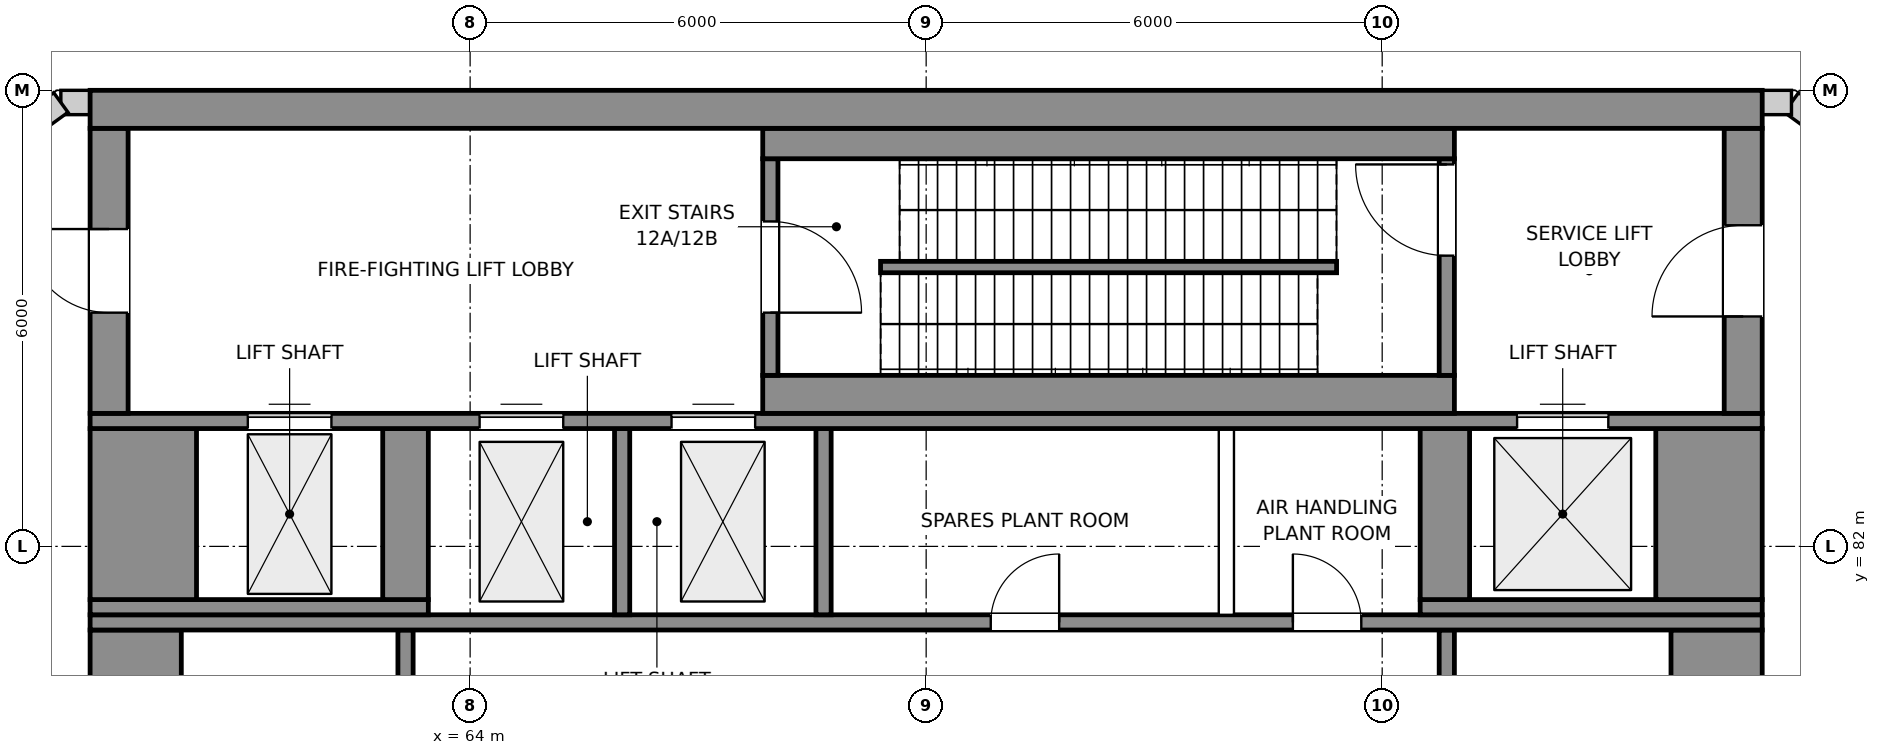
"""IFC4 building model, lengths in metres.
Left out: names, types, materials, properties, quantities, classifications, styles, units other than length and angle.
Written with IfcOpenShell. Run it as: python <this file> out.ifc"""

import sys

from ifc_helpers import new_model, si_unit, direction, frame, frame_2d, origin, place, context, subcontext, project, spatial, rectangle, extrude, element, fill, save


model = new_model("IFC4")
c1 = context("Model", 3, precision=1e-05, world=origin(), true_north=direction((0.0, 1.0)))
c2 = subcontext(c1, "Body", "Model", "MODEL_VIEW")
j1 = project(units=[si_unit("LENGTHUNIT", "METRE"), si_unit("PLANEANGLEUNIT", "RADIAN")], contexts=[c1])
p1 = place(None, origin())
s1 = spatial("IfcSite", under=j1, at=p1, CompositionType="ELEMENT")
p2 = place(p1, origin())
s2 = spatial("IfcBuilding", under=s1, at=p2, CompositionType="ELEMENT")
p3 = place(p2, frame((0.0, 0.0, 333.2)))
s3 = spatial("IfcBuildingStorey", under=s2, at=p3, CompositionType="ELEMENT", Elevation=333.2)
p4 = place(p3, frame((85.669, 84.728, 0.0), z_axis=(0.0, 0.0, 1.0), x_axis=(-0.808993209203, 0.587817988381, 0.0)))
e1 = element("IfcWall", 1, at=p4, inside=s3, PredefinedType="SOLIDWALL", context=c2, shape_type="SweptSolid", body=[
    extrude(rectangle(XDim=5.295, YDim=0.32, at=frame_2d((2.647, 0.0))), origin(), (0.0, 0.0, 1.0), 4.2),
])
for number, where, z_axis, x_axis in (
    (2, (81.385, 87.84, 0.0), (0.0, 0.0, 1.0), (-1.0, 0.0, 0.0)),
    (3, (59.0, 87.84, 0.0), (0.0, 0.0, 1.0), (-1.0, 0.0, 0.0)),
):
    element("IfcWall", number, at=place(p3, frame(where, z_axis=z_axis, x_axis=x_axis)), inside=s3, PredefinedType="SOLIDWALL", context=c2, shape_type="SweptSolid", body=[
        extrude(rectangle(XDim=0.385, YDim=0.32, at=frame_2d((0.192, 0.0))), origin(), (0.0, 0.0, 1.0), 4.2),
    ])
p5 = place(p3, frame((58.615, 87.84, 0.0), z_axis=(0.0, 0.0, 1.0), x_axis=(-0.808993209203, -0.587817988381, 0.0)))
e4 = element("IfcWall", 4, at=p5, inside=s3, PredefinedType="SOLIDWALL", context=c2, shape_type="SweptSolid", body=[
    extrude(rectangle(XDim=5.295, YDim=0.32, at=frame_2d((2.647, 0.0))), origin(), (0.0, 0.0, 1.0), 4.2),
])
for number, where, z_axis, x_axis in (
    (5, (59.6, 71.5, 0.0), (0.0, 0.0, 1.0), (0.0, 1.0, 0.0)),
    (6, (80.4, 71.5, 0.0), (0.0, 0.0, 1.0), (0.0, 1.0, 0.0)),
):
    element("IfcWall", number, at=place(p3, frame(where, z_axis=z_axis, x_axis=x_axis)), inside=s3, PredefinedType="SHEAR", context=c2, shape_type="SweptSolid", body=[
        extrude(rectangle(XDim=9.4, YDim=1.2, at=frame_2d((4.7, 0.0))), origin(), (0.0, 0.0, 1.0), 4.5),
    ])
for number, where, z_axis, x_axis in (
    (7, (63.15, 77.7, 0.0), (0.0, 0.0, 1.0), (0.0, 1.0, 0.0)),
    (8, (76.85, 77.7, 0.0), (0.0, 0.0, 1.0), (0.0, 1.0, 0.0)),
):
    element("IfcWall", number, at=place(p3, frame(where, z_axis=z_axis, x_axis=x_axis)), inside=s3, PredefinedType="SHEAR", context=c2, shape_type="SweptSolid", body=[
        extrude(rectangle(XDim=3.2, YDim=0.2, at=frame_2d((1.6, 0.0))), origin(), (0.0, 0.0, 1.0), 4.5),
    ])
p6 = place(p3, frame((59.0, 81.0, 0.0), z_axis=(0.0, 0.0, 1.0), x_axis=(1.0, 0.0, 0.0)))
e9 = element("IfcWall", 9, at=p6, inside=s3, PredefinedType="SHEAR", context=c2, shape_type="SweptSolid", body=[
    extrude(rectangle(XDim=22.0, YDim=0.2, at=frame_2d((11.0, 0.0))), origin(), (0.0, 0.0, 1.0), 4.5),
])
p7 = place(p6, frame((11.85, 0.0, 0.0)))
e10 = element("IfcOpeningElement", 10, at=p7, cuts=e9, PredefinedType="OPENING", context=c2, shape_type="SweptSolid", body=[
    extrude(rectangle(XDim=0.9, YDim=2.1, at=frame_2d((0.45, 1.05))), frame((0.0, 0.11, 0.0), z_axis=(0.0, -1.0, 0.0), x_axis=(1.0, 0.0, 0.0)), (0.0, 0.0, 1.0), 0.22),
])
p8 = place(p6, frame((15.825, 0.0, 0.0)))
e11 = element("IfcOpeningElement", 11, at=p8, cuts=e9, PredefinedType="OPENING", context=c2, shape_type="SweptSolid", body=[
    extrude(rectangle(XDim=0.9, YDim=2.1, at=frame_2d((0.45, 1.05))), frame((0.0, 0.11, 0.0), z_axis=(0.0, -1.0, 0.0), x_axis=(1.0, 0.0, 0.0)), (0.0, 0.0, 1.0), 0.22),
])
p9 = place(p3, frame((59.0, 81.2, 0.0), z_axis=(0.0, 0.0, 1.0), x_axis=(1.0, 0.0, 0.0)))
e12 = element("IfcWall", 12, at=p9, inside=s3, PredefinedType="SHEAR", context=c2, shape_type="SweptSolid", body=[
    extrude(rectangle(XDim=4.45, YDim=0.2, at=frame_2d((2.225, 0.0))), origin(), (0.0, 0.0, 1.0), 4.5),
])
for number, where, z_axis, x_axis in (
    (13, (66.0, 81.1, 0.0), (0.0, 0.0, 1.0), (0.0, 1.0, 0.0)),
    (14, (68.65, 81.1, 0.0), (0.0, 0.0, 1.0), (0.0, 1.0, 0.0)),
):
    element("IfcWall", number, at=place(p3, frame(where, z_axis=z_axis, x_axis=x_axis)), inside=s3, PredefinedType="SHEAR", context=c2, shape_type="SweptSolid", body=[
        extrude(rectangle(XDim=2.45, YDim=0.2, at=frame_2d((1.225, 0.0))), origin(), (0.0, 0.0, 1.0), 4.5),
    ])
p10 = place(p3, frame((73.95, 81.1, 0.0), z_axis=(0.0, 0.0, 1.0), x_axis=(0.0, 1.0, 0.0)))
e15 = element("IfcWall", 15, at=p10, inside=s3, PredefinedType="PARTITIONING", context=c2, shape_type="SweptSolid", body=[
    extrude(rectangle(XDim=2.45, YDim=0.2, at=frame_2d((1.225, 0.0))), origin(), (0.0, 0.0, 1.0), 4.2),
])
p11 = place(p3, frame((76.5, 81.2, 0.0), z_axis=(0.0, 0.0, 1.0), x_axis=(1.0, 0.0, 0.0)))
e16 = element("IfcWall", 16, at=p11, inside=s3, PredefinedType="SHEAR", context=c2, shape_type="SweptSolid", body=[
    extrude(rectangle(XDim=4.5, YDim=0.2, at=frame_2d((2.25, 0.0))), origin(), (0.0, 0.0, 1.0), 4.5),
])
p12 = place(p3, frame((59.7, 81.3, 0.0), z_axis=(0.0, 0.0, 1.0), x_axis=(0.0, 1.0, 0.0)))
e17 = element("IfcWall", 17, at=p12, inside=s3, PredefinedType="SHEAR", context=c2, shape_type="SweptSolid", body=[
    extrude(rectangle(XDim=2.25, YDim=1.4, at=frame_2d((1.125, 0.0))), origin(), (0.0, 0.0, 1.0), 4.5),
])
p13 = place(p3, frame((63.15, 81.3, 0.0), z_axis=(0.0, 0.0, 1.0), x_axis=(0.0, 1.0, 0.0)))
e18 = element("IfcWall", 18, at=p13, inside=s3, PredefinedType="SHEAR", context=c2, shape_type="SweptSolid", body=[
    extrude(rectangle(XDim=2.25, YDim=0.6, at=frame_2d((1.125, 0.0))), origin(), (0.0, 0.0, 1.0), 4.5),
])
p14 = place(p3, frame((76.825, 81.3, 0.0), z_axis=(0.0, 0.0, 1.0), x_axis=(0.0, 1.0, 0.0)))
e19 = element("IfcWall", 19, at=p14, inside=s3, PredefinedType="SHEAR", context=c2, shape_type="SweptSolid", body=[
    extrude(rectangle(XDim=2.25, YDim=0.65, at=frame_2d((1.125, 0.0))), origin(), (0.0, 0.0, 1.0), 4.5),
])
p15 = place(p3, frame((80.3, 81.3, 0.0), z_axis=(0.0, 0.0, 1.0), x_axis=(0.0, 1.0, 0.0)))
e20 = element("IfcWall", 20, at=p15, inside=s3, PredefinedType="SHEAR", context=c2, shape_type="SweptSolid", body=[
    extrude(rectangle(XDim=2.25, YDim=1.4, at=frame_2d((1.125, 0.0))), origin(), (0.0, 0.0, 1.0), 4.5),
])
p16 = place(p3, frame((59.0, 83.65, 0.0), z_axis=(0.0, 0.0, 1.0), x_axis=(1.0, 0.0, 0.0)))
e21 = element("IfcWall", 21, at=p16, inside=s3, PredefinedType="SHEAR", context=c2, shape_type="SweptSolid", body=[
    extrude(rectangle(XDim=22.0, YDim=0.2, at=frame_2d((11.0, 0.0))), origin(), (0.0, 0.0, 1.0), 4.5),
])
p17 = place(p16, frame((5.125, 0.0, 0.0)))
e22 = element("IfcOpeningElement", 22, at=p17, cuts=e21, PredefinedType="OPENING", context=c2, shape_type="SweptSolid", body=[
    extrude(rectangle(XDim=1.1, YDim=2.1, at=frame_2d((0.55, 1.05))), frame((0.0, 0.11, 0.0), z_axis=(0.0, -1.0, 0.0), x_axis=(1.0, 0.0, 0.0)), (0.0, 0.0, 1.0), 0.22),
])
p18 = place(p16, frame((7.65, 0.0, 0.0)))
e23 = element("IfcOpeningElement", 23, at=p18, cuts=e21, PredefinedType="OPENING", context=c2, shape_type="SweptSolid", body=[
    extrude(rectangle(XDim=1.1, YDim=2.1, at=frame_2d((0.55, 1.05))), frame((0.0, 0.11, 0.0), z_axis=(0.0, -1.0, 0.0), x_axis=(1.0, 0.0, 0.0)), (0.0, 0.0, 1.0), 0.22),
])
p19 = place(p16, frame((18.775, 0.0, 0.0)))
e24 = element("IfcOpeningElement", 24, at=p19, cuts=e21, PredefinedType="OPENING", context=c2, shape_type="SweptSolid", body=[
    extrude(rectangle(XDim=1.2, YDim=2.1, at=frame_2d((0.6, 1.05))), frame((0.0, 0.11, 0.0), z_axis=(0.0, -1.0, 0.0), x_axis=(1.0, 0.0, 0.0)), (0.0, 0.0, 1.0), 0.22),
])
p20 = place(p16, frame((2.075, 0.0, 0.0)))
e25 = element("IfcOpeningElement", 25, at=p20, cuts=e21, PredefinedType="OPENING", context=c2, shape_type="SweptSolid", body=[
    extrude(rectangle(XDim=1.1, YDim=2.1, at=frame_2d((0.55, 1.05))), frame((0.0, 0.11, 0.0), z_axis=(0.0, -1.0, 0.0), x_axis=(1.0, 0.0, 0.0)), (0.0, 0.0, 1.0), 0.22),
])
p21 = place(p3, frame((59.25, 83.75, 0.0), z_axis=(0.0, 0.0, 1.0), x_axis=(0.0, 1.0, 0.0)))
e26 = element("IfcWall", 26, at=p21, inside=s3, PredefinedType="SHEAR", context=c2, shape_type="SweptSolid", body=[
    extrude(rectangle(XDim=3.75, YDim=0.5, at=frame_2d((1.875, 0.0))), origin(), (0.0, 0.0, 1.0), 4.5),
])
p22 = place(p21, frame((1.325, 0.0, 0.0)))
e27 = element("IfcOpeningElement", 27, at=p22, cuts=e26, PredefinedType="OPENING", context=c2, shape_type="SweptSolid", body=[
    extrude(rectangle(XDim=1.1, YDim=2.1, at=frame_2d((0.55, 1.05))), frame((0.0, 0.26, 0.0), z_axis=(0.0, -1.0, 0.0), x_axis=(1.0, 0.0, 0.0)), (0.0, 0.0, 1.0), 0.52),
])
p23 = place(p3, frame((67.85, 84.0, 0.0), z_axis=(0.0, 0.0, 1.0), x_axis=(1.0, 0.0, 0.0)))
e28 = element("IfcWall", 28, at=p23, inside=s3, PredefinedType="SHEAR", context=c2, shape_type="SweptSolid", body=[
    extrude(rectangle(XDim=9.1, YDim=0.5, at=frame_2d((4.55, 0.0))), origin(), (0.0, 0.0, 1.0), 4.5),
])
p24 = place(p3, frame((80.75, 83.75, 0.0), z_axis=(0.0, 0.0, 1.0), x_axis=(0.0, 1.0, 0.0)))
e29 = element("IfcWall", 29, at=p24, inside=s3, PredefinedType="SHEAR", context=c2, shape_type="SweptSolid", body=[
    extrude(rectangle(XDim=3.75, YDim=0.5, at=frame_2d((1.875, 0.0))), origin(), (0.0, 0.0, 1.0), 4.5),
])
p25 = place(p24, frame((1.275, 0.0, 0.0)))
e30 = element("IfcOpeningElement", 30, at=p25, cuts=e29, PredefinedType="OPENING", context=c2, shape_type="SweptSolid", body=[
    extrude(rectangle(XDim=1.2, YDim=2.1, at=frame_2d((0.6, 1.05))), frame((0.0, 0.26, 0.0), z_axis=(0.0, -1.0, 0.0), x_axis=(1.0, 0.0, 0.0)), (0.0, 0.0, 1.0), 0.52),
])
p26 = place(p3, frame((67.95, 84.25, 0.0), z_axis=(0.0, 0.0, 1.0), x_axis=(0.0, 1.0, 0.0)))
e31 = element("IfcWall", 31, at=p26, inside=s3, PredefinedType="SHEAR", context=c2, shape_type="SweptSolid", body=[
    extrude(rectangle(XDim=2.85, YDim=0.2, at=frame_2d((1.425, 0.0))), origin(), (0.0, 0.0, 1.0), 4.5),
])
p27 = place(p26, frame((0.825, 0.0, 0.0)))
e32 = element("IfcOpeningElement", 32, at=p27, cuts=e31, PredefinedType="OPENING", context=c2, shape_type="SweptSolid", body=[
    extrude(rectangle(XDim=1.2, YDim=2.1, at=frame_2d((0.6, 1.05))), frame((0.0, 0.11, 0.0), z_axis=(0.0, -1.0, 0.0), x_axis=(1.0, 0.0, 0.0)), (0.0, 0.0, 1.0), 0.22),
])
p28 = place(p3, frame((76.85, 84.25, 0.0), z_axis=(0.0, 0.0, 1.0), x_axis=(0.0, 1.0, 0.0)))
e33 = element("IfcWall", 33, at=p28, inside=s3, PredefinedType="SHEAR", context=c2, shape_type="SweptSolid", body=[
    extrude(rectangle(XDim=2.85, YDim=0.2, at=frame_2d((1.425, 0.0))), origin(), (0.0, 0.0, 1.0), 4.5),
])
p29 = place(p28, frame((1.575, 0.0, 0.0)))
e34 = element("IfcOpeningElement", 34, at=p29, cuts=e33, PredefinedType="OPENING", context=c2, shape_type="SweptSolid", body=[
    extrude(rectangle(XDim=1.2, YDim=2.1, at=frame_2d((0.6, 1.05))), frame((0.0, 0.11, 0.0), z_axis=(0.0, -1.0, 0.0), x_axis=(1.0, 0.0, 0.0)), (0.0, 0.0, 1.0), 0.22),
])
p30 = place(p3, frame((67.85, 87.3, 0.0), z_axis=(0.0, 0.0, 1.0), x_axis=(1.0, 0.0, 0.0)))
e35 = element("IfcWall", 35, at=p30, inside=s3, PredefinedType="SHEAR", context=c2, shape_type="SweptSolid", body=[
    extrude(rectangle(XDim=9.1, YDim=0.4, at=frame_2d((4.55, 0.0))), origin(), (0.0, 0.0, 1.0), 4.5),
])
p31 = place(p3, frame((59.0, 87.75, 0.0), z_axis=(0.0, 0.0, 1.0), x_axis=(1.0, 0.0, 0.0)))
e36 = element("IfcWall", 36, at=p31, inside=s3, PredefinedType="SHEAR", context=c2, shape_type="SweptSolid", body=[
    extrude(rectangle(XDim=22.0, YDim=0.5, at=frame_2d((11.0, 0.0))), origin(), (0.0, 0.0, 1.0), 4.5),
])
p32 = place(p3, frame((69.4, 85.675, 0.0), z_axis=(0.0, 0.0, 1.0), x_axis=(1.0, 0.0, 0.0)))
e37 = element("IfcWall", 37, at=p32, inside=s3, PredefinedType="SHEAR", context=c2, shape_type="SweptSolid", body=[
    extrude(rectangle(XDim=6.0, YDim=0.15, at=frame_2d((3.0, 0.0))), origin(), (0.0, 0.0, 1.0), 4.5),
])
p33 = place(p27, frame((1.2, 0.0, 0.0), z_axis=(0.0, 0.0, 1.0), x_axis=(-1.0, 0.0, 0.0)))
e38 = element("IfcDoor", 38, at=p33, inside=s3, OperationType="SINGLE_SWING_RIGHT", PredefinedType="DOOR", context=c2, shape_type="SweptSolid", body=[
    extrude(rectangle(XDim=1.2, YDim=2.1, at=frame_2d((0.6, 1.05))), frame((0.0, 0.025, 0.0), z_axis=(0.0, -1.0, 0.0), x_axis=(1.0, 0.0, 0.0)), (0.0, 0.0, 1.0), 0.05),
])
fill(e32, e38)
p34 = place(p29, origin())
e39 = element("IfcDoor", 39, at=p34, inside=s3, OperationType="SINGLE_SWING_RIGHT", PredefinedType="DOOR", context=c2, shape_type="SweptSolid", body=[
    extrude(rectangle(XDim=1.2, YDim=2.1, at=frame_2d((0.6, 1.05))), frame((0.0, 0.025, 0.0), z_axis=(0.0, -1.0, 0.0), x_axis=(1.0, 0.0, 0.0)), (0.0, 0.0, 1.0), 0.05),
])
fill(e34, e39)
p35 = place(p22, origin())
e40 = element("IfcDoor", 40, at=p35, inside=s3, OperationType="SINGLE_SWING_RIGHT", PredefinedType="DOOR", context=c2, shape_type="SweptSolid", body=[
    extrude(rectangle(XDim=1.1, YDim=2.1, at=frame_2d((0.55, 1.05))), frame((0.0, 0.025, 0.0), z_axis=(0.0, -1.0, 0.0), x_axis=(1.0, 0.0, 0.0)), (0.0, 0.0, 1.0), 0.05),
])
fill(e27, e40)
p36 = place(p25, origin())
e41 = element("IfcDoor", 41, at=p36, inside=s3, OperationType="SINGLE_SWING_LEFT", PredefinedType="DOOR", context=c2, shape_type="SweptSolid", body=[
    extrude(rectangle(XDim=1.2, YDim=2.1, at=frame_2d((0.6, 1.05))), frame((0.0, 0.025, 0.0), z_axis=(0.0, -1.0, 0.0), x_axis=(1.0, 0.0, 0.0)), (0.0, 0.0, 1.0), 0.05),
])
fill(e30, e41)
p37 = place(p17, origin())
e42 = element("IfcDoor", 42, at=p37, inside=s3, OperationType="DOUBLE_DOOR_SLIDING", PredefinedType="DOOR", context=c2, shape_type="SweptSolid", body=[
    extrude(rectangle(XDim=1.1, YDim=2.1, at=frame_2d((0.55, 1.05))), frame((0.0, 0.025, 0.0), z_axis=(0.0, -1.0, 0.0), x_axis=(1.0, 0.0, 0.0)), (0.0, 0.0, 1.0), 0.05),
])
fill(e22, e42)
p38 = place(p18, origin())
e43 = element("IfcDoor", 43, at=p38, inside=s3, OperationType="DOUBLE_DOOR_SLIDING", PredefinedType="DOOR", context=c2, shape_type="SweptSolid", body=[
    extrude(rectangle(XDim=1.1, YDim=2.1, at=frame_2d((0.55, 1.05))), frame((0.0, 0.025, 0.0), z_axis=(0.0, -1.0, 0.0), x_axis=(1.0, 0.0, 0.0)), (0.0, 0.0, 1.0), 0.05),
])
fill(e23, e43)
p39 = place(p19, origin())
e44 = element("IfcDoor", 44, at=p39, inside=s3, OperationType="DOUBLE_DOOR_SLIDING", PredefinedType="DOOR", context=c2, shape_type="SweptSolid", body=[
    extrude(rectangle(XDim=1.2, YDim=2.1, at=frame_2d((0.6, 1.05))), frame((0.0, 0.025, 0.0), z_axis=(0.0, -1.0, 0.0), x_axis=(1.0, 0.0, 0.0)), (0.0, 0.0, 1.0), 0.05),
])
fill(e24, e44)
p40 = place(p20, origin())
e45 = element("IfcDoor", 45, at=p40, inside=s3, OperationType="DOUBLE_DOOR_SLIDING", PredefinedType="DOOR", context=c2, shape_type="SweptSolid", body=[
    extrude(rectangle(XDim=1.1, YDim=2.1, at=frame_2d((0.55, 1.05))), frame((0.0, 0.025, 0.0), z_axis=(0.0, -1.0, 0.0), x_axis=(1.0, 0.0, 0.0)), (0.0, 0.0, 1.0), 0.05),
])
fill(e25, e45)
p41 = place(p7, origin())
e46 = element("IfcDoor", 46, at=p41, inside=s3, OperationType="SINGLE_SWING_RIGHT", PredefinedType="DOOR", context=c2, shape_type="SweptSolid", body=[
    extrude(rectangle(XDim=0.9, YDim=2.1, at=frame_2d((0.45, 1.05))), frame((0.0, 0.025, 0.0), z_axis=(0.0, -1.0, 0.0), x_axis=(1.0, 0.0, 0.0)), (0.0, 0.0, 1.0), 0.05),
])
fill(e10, e46)
p42 = place(p8, origin())
e47 = element("IfcDoor", 47, at=p42, inside=s3, OperationType="SINGLE_SWING_LEFT", PredefinedType="DOOR", context=c2, shape_type="SweptSolid", body=[
    extrude(rectangle(XDim=0.9, YDim=2.1, at=frame_2d((0.45, 1.05))), frame((0.0, 0.025, 0.0), z_axis=(0.0, -1.0, 0.0), x_axis=(1.0, 0.0, 0.0)), (0.0, 0.0, 1.0), 0.05),
])
fill(e11, e47)
save(model, sys.argv[1])
